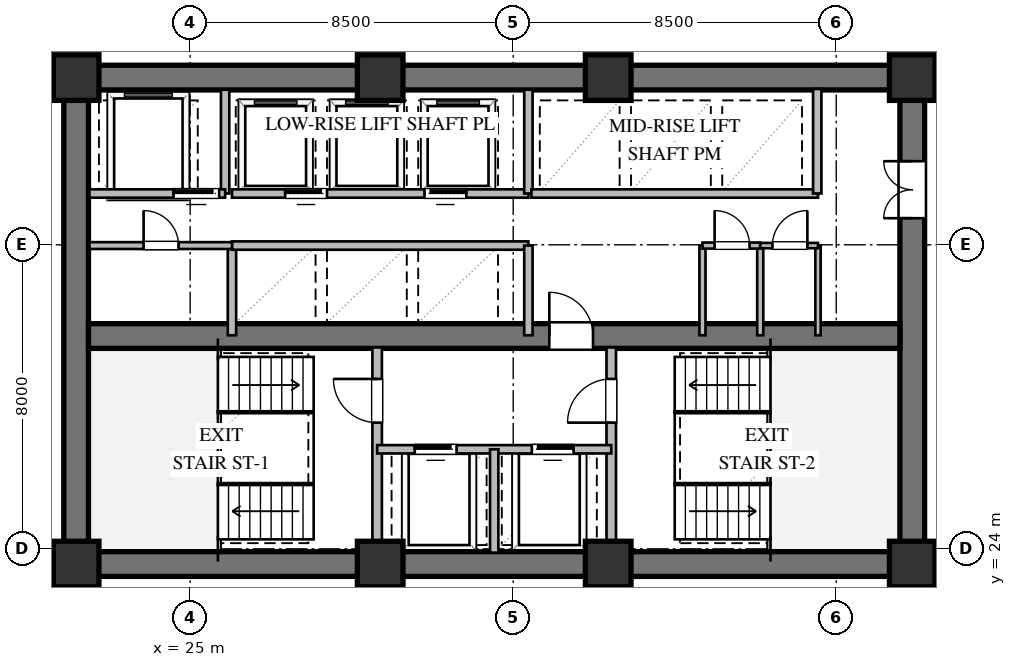
"""IFC4 building model, lengths in metres.
Left out: names, types, materials, properties, quantities, classifications, styles, units other than length and angle.
Written with IfcOpenShell. Run it as: python <this file> out.ifc"""

import sys

from ifc_helpers import new_model, si_unit, direction, frame, frame_2d, origin, origin_2d, place, context, subcontext, project, spatial, rectangle, extrude, element, fill, save


model = new_model("IFC4")
c1 = context("Model", 3, precision=1e-05, world=origin(), true_north=direction((0.0, 1.0)))
c2 = subcontext(c1, "Body", "Model", "MODEL_VIEW")
j1 = project(units=[si_unit("LENGTHUNIT", "METRE"), si_unit("PLANEANGLEUNIT", "RADIAN")], contexts=[c1])
p1 = place(None, origin())
s1 = spatial("IfcSite", under=j1, at=p1, CompositionType="ELEMENT")
p2 = place(p1, origin())
s2 = spatial("IfcBuilding", under=s1, at=p2, CompositionType="ELEMENT")
p3 = place(p2, frame((0.0, 0.0, 70.8)))
s3 = spatial("IfcBuildingStorey", under=s2, at=p3, CompositionType="ELEMENT", Elevation=70.8)
for number, where, z_axis, x_axis in (
    (1, (21.675, 23.6, 0.0), (0.0, 0.0, 1.0), (1.0, 0.0, 0.0)),
    (2, (21.675, 36.4, 0.0), (0.0, 0.0, 1.0), (1.0, 0.0, 0.0)),
):
    element("IfcWall", number, at=place(p3, frame(where, z_axis=z_axis, x_axis=x_axis)), inside=s3, PredefinedType="SHEAR", context=c2, shape_type="SweptSolid", body=[
        extrude(rectangle(XDim=22.65, YDim=0.65, at=frame_2d((11.325, 0.0))), origin(), (0.0, 0.0, 1.0), 3.36),
    ])
p4 = place(p3, frame((22.0, 23.925, 0.0), z_axis=(0.0, 0.0, 1.0), x_axis=(0.0, 1.0, 0.0)))
e3 = element("IfcWall", 3, at=p4, inside=s3, PredefinedType="SHEAR", context=c2, shape_type="SweptSolid", body=[
    extrude(rectangle(XDim=12.15, YDim=0.65, at=frame_2d((6.075, 0.0))), origin(), (0.0, 0.0, 1.0), 3.36),
])
p5 = place(p3, frame((44.0, 23.925, 0.0), z_axis=(0.0, 0.0, 1.0), x_axis=(0.0, 1.0, 0.0)))
e4 = element("IfcWall", 4, at=p5, inside=s3, PredefinedType="SHEAR", context=c2, shape_type="SweptSolid", body=[
    extrude(rectangle(XDim=12.15, YDim=0.65, at=frame_2d((6.075, 0.0))), origin(), (0.0, 0.0, 1.0), 3.36),
])
p6 = place(p5, frame((8.775, 0.0, 0.0)))
e5 = element("IfcOpeningElement", 5, at=p6, cuts=e4, PredefinedType="OPENING", context=c2, shape_type="SweptSolid", body=[
    extrude(rectangle(XDim=1.5, YDim=2.15, at=frame_2d((0.75, 1.075))), frame((0.0, 0.335, 0.0), z_axis=(0.0, -1.0, 0.0), x_axis=(1.0, 0.0, 0.0)), (0.0, 0.0, 1.0), 0.67),
])
p7 = place(p3, frame((22.325, 29.6, 0.0), z_axis=(0.0, 0.0, 1.0), x_axis=(1.0, 0.0, 0.0)))
e6 = element("IfcWall", 6, at=p7, inside=s3, PredefinedType="SHEAR", context=c2, shape_type="SweptSolid", body=[
    extrude(rectangle(XDim=21.35, YDim=0.65, at=frame_2d((10.675, 0.0))), origin(), (0.0, 0.0, 1.0), 3.36),
])
p8 = place(p7, frame((12.125, 0.0, 0.0)))
e7 = element("IfcOpeningElement", 7, at=p8, cuts=e6, PredefinedType="OPENING", context=c2, shape_type="SweptSolid", body=[
    extrude(rectangle(XDim=1.15, YDim=2.1, at=frame_2d((0.575, 1.05))), frame((0.0, 0.335, 0.0), z_axis=(0.0, -1.0, 0.0), x_axis=(1.0, 0.0, 0.0)), (0.0, 0.0, 1.0), 0.67),
])
for number, where, z_axis, x_axis in (
    (8, (22.0, 23.6, 0.0), (0.0, 0.0, 1.0), (1.0, 0.0, 0.0)),
    (9, (30.0, 23.6, 0.0), (0.0, 0.0, 1.0), (1.0, 0.0, 0.0)),
    (10, (36.0, 23.6, 0.0), (0.0, 0.0, 1.0), (1.0, 0.0, 0.0)),
    (11, (44.0, 23.6, 0.0), (0.0, 0.0, 1.0), (1.0, 0.0, 0.0)),
    (12, (44.0, 36.4, 0.0), (0.0, 0.0, 1.0), (1.0, 0.0, 0.0)),
    (13, (36.0, 36.4, 0.0), (0.0, 0.0, 1.0), (1.0, 0.0, 0.0)),
    (14, (30.0, 36.4, 0.0), (0.0, 0.0, 1.0), (1.0, 0.0, 0.0)),
    (15, (22.0, 36.4, 0.0), (0.0, 0.0, 1.0), (1.0, 0.0, 0.0)),
):
    element("IfcColumn", number, at=place(p3, frame(where, z_axis=z_axis, x_axis=x_axis)), inside=s3, PredefinedType="COLUMN", context=c2, shape_type="SweptSolid", body=[
        extrude(rectangle(XDim=1.2, YDim=1.2, at=origin_2d()), origin(), (0.0, 0.0, 1.0), 3.6),
    ])
p9 = place(p3, frame((29.92, 23.9, 0.0), z_axis=(0.0, 0.0, 1.0), x_axis=(0.0, 1.0, 0.0)))
e16 = element("IfcWall", 16, at=p9, inside=s3, PredefinedType="SOLIDWALL", context=c2, shape_type="SweptSolid", body=[
    extrude(rectangle(XDim=5.4, YDim=0.25, at=frame_2d((2.7, 0.0))), origin(), (0.0, 0.0, 1.0), 3.36),
])
p10 = place(p9, frame((3.421, 0.0, 0.0)))
e17 = element("IfcOpeningElement", 17, at=p10, cuts=e16, PredefinedType="OPENING", context=c2, shape_type="SweptSolid", body=[
    extrude(rectangle(XDim=1.15, YDim=2.1, at=frame_2d((0.575, 1.05))), frame((0.0, 0.135, 0.0), z_axis=(0.0, -1.0, 0.0), x_axis=(1.0, 0.0, 0.0)), (0.0, 0.0, 1.0), 0.27),
])
p11 = place(p3, frame((36.08, 23.9, 0.0), z_axis=(0.0, 0.0, 1.0), x_axis=(0.0, 1.0, 0.0)))
e18 = element("IfcWall", 18, at=p11, inside=s3, PredefinedType="SOLIDWALL", context=c2, shape_type="SweptSolid", body=[
    extrude(rectangle(XDim=5.4, YDim=0.25, at=frame_2d((2.7, 0.0))), origin(), (0.0, 0.0, 1.0), 3.36),
])
p12 = place(p11, frame((3.421, 0.0, 0.0)))
e19 = element("IfcOpeningElement", 19, at=p12, cuts=e18, PredefinedType="OPENING", context=c2, shape_type="SweptSolid", body=[
    extrude(rectangle(XDim=1.15, YDim=2.1, at=frame_2d((0.575, 1.05))), frame((0.0, 0.135, 0.0), z_axis=(0.0, -1.0, 0.0), x_axis=(1.0, 0.0, 0.0)), (0.0, 0.0, 1.0), 0.27),
])
p13 = place(p3, frame((29.92, 26.62, 0.0), z_axis=(0.0, 0.0, 1.0), x_axis=(1.0, 0.0, 0.0)))
e20 = element("IfcWall", 20, at=p13, inside=s3, PredefinedType="SOLIDWALL", context=c2, shape_type="SweptSolid", body=[
    extrude(rectangle(XDim=6.16, YDim=0.22, at=frame_2d((3.08, 0.0))), origin(), (0.0, 0.0, 1.0), 3.36),
])
p14 = place(p13, frame((0.99, 0.0, 0.0)))
e21 = element("IfcOpeningElement", 21, at=p14, cuts=e20, PredefinedType="OPENING", context=c2, shape_type="SweptSolid", body=[
    extrude(rectangle(XDim=1.1, YDim=2.1, at=frame_2d((0.55, 1.05))), frame((0.0, 0.12, 0.0), z_axis=(0.0, -1.0, 0.0), x_axis=(1.0, 0.0, 0.0)), (0.0, 0.0, 1.0), 0.24),
])
p15 = place(p13, frame((4.07, 0.0, 0.0)))
e22 = element("IfcOpeningElement", 22, at=p15, cuts=e20, PredefinedType="OPENING", context=c2, shape_type="SweptSolid", body=[
    extrude(rectangle(XDim=1.1, YDim=2.1, at=frame_2d((0.55, 1.05))), frame((0.0, 0.12, 0.0), z_axis=(0.0, -1.0, 0.0), x_axis=(1.0, 0.0, 0.0)), (0.0, 0.0, 1.0), 0.24),
])
p16 = place(p3, frame((33.0, 23.9, 0.0), z_axis=(0.0, 0.0, 1.0), x_axis=(0.0, 1.0, 0.0)))
e23 = element("IfcWall", 23, at=p16, inside=s3, PredefinedType="SOLIDWALL", context=c2, shape_type="SweptSolid", body=[
    extrude(rectangle(XDim=2.72, YDim=0.22, at=frame_2d((1.36, 0.0))), origin(), (0.0, 0.0, 1.0), 3.36),
])
p17 = place(p3, frame((25.92, 33.35, 0.0), z_axis=(0.0, 0.0, 1.0), x_axis=(0.0, 1.0, 0.0)))
e24 = element("IfcWall", 24, at=p17, inside=s3, PredefinedType="SOLIDWALL", context=c2, shape_type="SweptSolid", body=[
    extrude(rectangle(XDim=2.73, YDim=0.22, at=frame_2d((1.365, 0.0))), origin(), (0.0, 0.0, 1.0), 3.36),
])
p18 = place(p3, frame((22.35, 33.35, 0.0), z_axis=(0.0, 0.0, 1.0), x_axis=(1.0, 0.0, 0.0)))
e25 = element("IfcWall", 25, at=p18, inside=s3, PredefinedType="SOLIDWALL", context=c2, shape_type="SweptSolid", body=[
    extrude(rectangle(XDim=3.57, YDim=0.22, at=frame_2d((1.785, 0.0))), origin(), (0.0, 0.0, 1.0), 3.36),
])
p19 = place(p18, frame((2.213, 0.0, 0.0)))
e26 = element("IfcOpeningElement", 26, at=p19, cuts=e25, PredefinedType="OPENING", context=c2, shape_type="SweptSolid", body=[
    extrude(rectangle(XDim=1.2, YDim=2.1, at=frame_2d((0.6, 1.05))), frame((0.0, 0.12, 0.0), z_axis=(0.0, -1.0, 0.0), x_axis=(1.0, 0.0, 0.0)), (0.0, 0.0, 1.0), 0.24),
])
p20 = place(p3, frame((26.1, 29.62, 0.0), z_axis=(0.0, 0.0, 1.0), x_axis=(0.0, 1.0, 0.0)))
e27 = element("IfcWall", 27, at=p20, inside=s3, PredefinedType="SOLIDWALL", context=c2, shape_type="SweptSolid", body=[
    extrude(rectangle(XDim=2.36, YDim=0.22, at=frame_2d((1.18, 0.0))), origin(), (0.0, 0.0, 1.0), 3.36),
])
p21 = place(p3, frame((26.1, 31.98, 0.0), z_axis=(0.0, 0.0, 1.0), x_axis=(1.0, 0.0, 0.0)))
e28 = element("IfcWall", 28, at=p21, inside=s3, PredefinedType="SOLIDWALL", context=c2, shape_type="SweptSolid", body=[
    extrude(rectangle(XDim=7.8, YDim=0.22, at=frame_2d((3.9, 0.0))), origin(), (0.0, 0.0, 1.0), 3.36),
])
p22 = place(p3, frame((33.9, 29.62, 0.0), z_axis=(0.0, 0.0, 1.0), x_axis=(0.0, 1.0, 0.0)))
e29 = element("IfcWall", 29, at=p22, inside=s3, PredefinedType="SOLIDWALL", context=c2, shape_type="SweptSolid", body=[
    extrude(rectangle(XDim=2.36, YDim=0.22, at=frame_2d((1.18, 0.0))), origin(), (0.0, 0.0, 1.0), 3.36),
])
p23 = place(p3, frame((26.1, 33.35, 0.0), z_axis=(0.0, 0.0, 1.0), x_axis=(1.0, 0.0, 0.0)))
e30 = element("IfcWall", 30, at=p23, inside=s3, PredefinedType="SOLIDWALL", context=c2, shape_type="SweptSolid", body=[
    extrude(rectangle(XDim=7.8, YDim=0.22, at=frame_2d((3.9, 0.0))), origin(), (0.0, 0.0, 1.0), 3.36),
])
p24 = place(p23, frame((1.4, 0.0, 0.0)))
e31 = element("IfcOpeningElement", 31, at=p24, cuts=e30, PredefinedType="OPENING", context=c2, shape_type="SweptSolid", body=[
    extrude(rectangle(XDim=1.1, YDim=2.1, at=frame_2d((0.55, 1.05))), frame((0.0, 0.12, 0.0), z_axis=(0.0, -1.0, 0.0), x_axis=(1.0, 0.0, 0.0)), (0.0, 0.0, 1.0), 0.24),
])
p25 = place(p23, frame((5.066, 0.0, 0.0)))
e32 = element("IfcOpeningElement", 32, at=p25, cuts=e30, PredefinedType="OPENING", context=c2, shape_type="SweptSolid", body=[
    extrude(rectangle(XDim=1.1, YDim=2.1, at=frame_2d((0.55, 1.05))), frame((0.0, 0.12, 0.0), z_axis=(0.0, -1.0, 0.0), x_axis=(1.0, 0.0, 0.0)), (0.0, 0.0, 1.0), 0.24),
])
p26 = place(p3, frame((33.9, 33.35, 0.0), z_axis=(0.0, 0.0, 1.0), x_axis=(0.0, 1.0, 0.0)))
e33 = element("IfcWall", 33, at=p26, inside=s3, PredefinedType="SOLIDWALL", context=c2, shape_type="SweptSolid", body=[
    extrude(rectangle(XDim=2.73, YDim=0.22, at=frame_2d((1.365, 0.0))), origin(), (0.0, 0.0, 1.0), 3.36),
])
p27 = place(p3, frame((33.98, 33.35, 0.0), z_axis=(0.0, 0.0, 1.0), x_axis=(1.0, 0.0, 0.0)))
e34 = element("IfcWall", 34, at=p27, inside=s3, PredefinedType="SOLIDWALL", context=c2, shape_type="SweptSolid", body=[
    extrude(rectangle(XDim=7.54, YDim=0.22, at=frame_2d((3.77, 0.0))), origin(), (0.0, 0.0, 1.0), 3.36),
])
p28 = place(p3, frame((41.5, 33.35, 0.0), z_axis=(0.0, 0.0, 1.0), x_axis=(0.0, 1.0, 0.0)))
e35 = element("IfcWall", 35, at=p28, inside=s3, PredefinedType="SOLIDWALL", context=c2, shape_type="SweptSolid", body=[
    extrude(rectangle(XDim=2.75, YDim=0.22, at=frame_2d((1.375, 0.0))), origin(), (0.0, 0.0, 1.0), 3.36),
])
p29 = place(p3, frame((22.35, 31.98, 0.0), z_axis=(0.0, 0.0, 1.0), x_axis=(1.0, 0.0, 0.0)))
e36 = element("IfcWall", 36, at=p29, inside=s3, PredefinedType="PARTITIONING", context=c2, shape_type="SweptSolid", body=[
    extrude(rectangle(XDim=3.75, YDim=0.18, at=frame_2d((1.875, 0.0))), origin(), (0.0, 0.0, 1.0), 3.36),
])
p30 = place(p29, frame((1.425, 0.0, 0.0)))
e37 = element("IfcOpeningElement", 37, at=p30, cuts=e36, PredefinedType="OPENING", context=c2, shape_type="SweptSolid", body=[
    extrude(rectangle(XDim=0.92, YDim=2.1, at=frame_2d((0.46, 1.05))), frame((0.0, 0.1, 0.0), z_axis=(0.0, -1.0, 0.0), x_axis=(1.0, 0.0, 0.0)), (0.0, 0.0, 1.0), 0.2),
])
for number, where, z_axis, x_axis in (
    (38, (38.48, 29.62, 0.0), (0.0, 0.0, 1.0), (0.0, 1.0, 0.0)),
    (39, (40.0, 29.62, 0.0), (0.0, 0.0, 1.0), (0.0, 1.0, 0.0)),
):
    element("IfcWall", number, at=place(p3, frame(where, z_axis=z_axis, x_axis=x_axis)), inside=s3, PredefinedType="PLUMBINGWALL", context=c2, shape_type="SweptSolid", body=[
        extrude(rectangle(XDim=2.36, YDim=0.16, at=frame_2d((1.18, 0.0))), origin(), (0.0, 0.0, 1.0), 3.36),
    ])
p31 = place(p3, frame((41.52, 29.62, 0.0), z_axis=(0.0, 0.0, 1.0), x_axis=(0.0, 1.0, 0.0)))
e40 = element("IfcWall", 40, at=p31, inside=s3, PredefinedType="PARTITIONING", context=c2, shape_type="SweptSolid", body=[
    extrude(rectangle(XDim=2.36, YDim=0.14, at=frame_2d((1.18, 0.0))), origin(), (0.0, 0.0, 1.0), 3.36),
])
p32 = place(p3, frame((38.48, 31.98, 0.0), z_axis=(0.0, 0.0, 1.0), x_axis=(1.0, 0.0, 0.0)))
e41 = element("IfcWall", 41, at=p32, inside=s3, PredefinedType="PLUMBINGWALL", context=c2, shape_type="SweptSolid", body=[
    extrude(rectangle(XDim=1.52, YDim=0.16, at=frame_2d((0.76, 0.0))), origin(), (0.0, 0.0, 1.0), 3.36),
])
p33 = place(p32, frame((0.32, 0.0, 0.0)))
e42 = element("IfcOpeningElement", 42, at=p33, cuts=e41, PredefinedType="OPENING", context=c2, shape_type="SweptSolid", body=[
    extrude(rectangle(XDim=0.92, YDim=2.1, at=frame_2d((0.46, 1.05))), frame((0.0, 0.09, 0.0), z_axis=(0.0, -1.0, 0.0), x_axis=(1.0, 0.0, 0.0)), (0.0, 0.0, 1.0), 0.18),
])
p34 = place(p3, frame((40.0, 31.98, 0.0), z_axis=(0.0, 0.0, 1.0), x_axis=(1.0, 0.0, 0.0)))
e43 = element("IfcWall", 43, at=p34, inside=s3, PredefinedType="PARTITIONING", context=c2, shape_type="SweptSolid", body=[
    extrude(rectangle(XDim=1.52, YDim=0.14, at=frame_2d((0.76, 0.0))), origin(), (0.0, 0.0, 1.0), 3.36),
])
p35 = place(p34, frame((0.32, 0.0, 0.0)))
e44 = element("IfcOpeningElement", 44, at=p35, cuts=e43, PredefinedType="OPENING", context=c2, shape_type="SweptSolid", body=[
    extrude(rectangle(XDim=0.92, YDim=2.1, at=frame_2d((0.46, 1.05))), frame((0.0, 0.08, 0.0), z_axis=(0.0, -1.0, 0.0), x_axis=(1.0, 0.0, 0.0)), (0.0, 0.0, 1.0), 0.16),
])
p36 = place(p10, origin())
e45 = element("IfcDoor", 45, at=p36, inside=s3, OperationType="SINGLE_SWING_RIGHT", PredefinedType="DOOR", context=c2, shape_type="SweptSolid", body=[
    extrude(rectangle(XDim=1.15, YDim=2.1, at=frame_2d((0.575, 1.05))), frame((0.0, 0.025, 0.0), z_axis=(0.0, -1.0, 0.0), x_axis=(1.0, 0.0, 0.0)), (0.0, 0.0, 1.0), 0.05),
])
fill(e17, e45)
p37 = place(p12, origin())
e46 = element("IfcDoor", 46, at=p37, inside=s3, OperationType="SINGLE_SWING_LEFT", PredefinedType="DOOR", context=c2, shape_type="SweptSolid", body=[
    extrude(rectangle(XDim=1.15, YDim=2.1, at=frame_2d((0.575, 1.05))), frame((0.0, 0.025, 0.0), z_axis=(0.0, -1.0, 0.0), x_axis=(1.0, 0.0, 0.0)), (0.0, 0.0, 1.0), 0.05),
])
fill(e19, e46)
p38 = place(p14, origin())
e47 = element("IfcDoor", 47, at=p38, inside=s3, OperationType="SLIDING_TO_LEFT", PredefinedType="DOOR", context=c2, shape_type="SweptSolid", body=[
    extrude(rectangle(XDim=1.1, YDim=2.1, at=frame_2d((0.55, 1.05))), frame((0.0, 0.025, 0.0), z_axis=(0.0, -1.0, 0.0), x_axis=(1.0, 0.0, 0.0)), (0.0, 0.0, 1.0), 0.05),
])
fill(e21, e47)
p39 = place(p15, origin())
e48 = element("IfcDoor", 48, at=p39, inside=s3, OperationType="SLIDING_TO_RIGHT", PredefinedType="DOOR", context=c2, shape_type="SweptSolid", body=[
    extrude(rectangle(XDim=1.1, YDim=2.1, at=frame_2d((0.55, 1.05))), frame((0.0, 0.025, 0.0), z_axis=(0.0, -1.0, 0.0), x_axis=(1.0, 0.0, 0.0)), (0.0, 0.0, 1.0), 0.05),
])
fill(e22, e48)
p40 = place(p8, origin())
e49 = element("IfcDoor", 49, at=p40, inside=s3, OperationType="SINGLE_SWING_LEFT", PredefinedType="DOOR", context=c2, shape_type="SweptSolid", body=[
    extrude(rectangle(XDim=1.15, YDim=2.1, at=frame_2d((0.575, 1.05))), frame((0.0, 0.025, 0.0), z_axis=(0.0, -1.0, 0.0), x_axis=(1.0, 0.0, 0.0)), (0.0, 0.0, 1.0), 0.05),
])
fill(e7, e49)
p41 = place(p6, origin())
e50 = element("IfcDoor", 50, at=p41, inside=s3, OperationType="DOUBLE_DOOR_SINGLE_SWING", PredefinedType="DOOR", context=c2, shape_type="SweptSolid", body=[
    extrude(rectangle(XDim=1.5, YDim=2.15, at=frame_2d((0.75, 1.075))), frame((0.0, 0.025, 0.0), z_axis=(0.0, -1.0, 0.0), x_axis=(1.0, 0.0, 0.0)), (0.0, 0.0, 1.0), 0.05),
])
fill(e5, e50)
p42 = place(p19, origin())
e51 = element("IfcDoor", 51, at=p42, inside=s3, OperationType="SLIDING_TO_LEFT", PredefinedType="DOOR", context=c2, shape_type="SweptSolid", body=[
    extrude(rectangle(XDim=1.2, YDim=2.1, at=frame_2d((0.6, 1.05))), frame((0.0, 0.025, 0.0), z_axis=(0.0, -1.0, 0.0), x_axis=(1.0, 0.0, 0.0)), (0.0, 0.0, 1.0), 0.05),
])
fill(e26, e51)
p43 = place(p24, origin())
e52 = element("IfcDoor", 52, at=p43, inside=s3, OperationType="SLIDING_TO_LEFT", PredefinedType="DOOR", context=c2, shape_type="SweptSolid", body=[
    extrude(rectangle(XDim=1.1, YDim=2.1, at=frame_2d((0.55, 1.05))), frame((0.0, 0.025, 0.0), z_axis=(0.0, -1.0, 0.0), x_axis=(1.0, 0.0, 0.0)), (0.0, 0.0, 1.0), 0.05),
])
fill(e31, e52)
p44 = place(p25, origin())
e53 = element("IfcDoor", 53, at=p44, inside=s3, OperationType="SLIDING_TO_RIGHT", PredefinedType="DOOR", context=c2, shape_type="SweptSolid", body=[
    extrude(rectangle(XDim=1.1, YDim=2.1, at=frame_2d((0.55, 1.05))), frame((0.0, 0.025, 0.0), z_axis=(0.0, -1.0, 0.0), x_axis=(1.0, 0.0, 0.0)), (0.0, 0.0, 1.0), 0.05),
])
fill(e32, e53)
p45 = place(p30, origin())
e54 = element("IfcDoor", 54, at=p45, inside=s3, OperationType="SINGLE_SWING_LEFT", PredefinedType="DOOR", context=c2, shape_type="SweptSolid", body=[
    extrude(rectangle(XDim=0.92, YDim=2.1, at=frame_2d((0.46, 1.05))), frame((0.0, 0.025, 0.0), z_axis=(0.0, -1.0, 0.0), x_axis=(1.0, 0.0, 0.0)), (0.0, 0.0, 1.0), 0.05),
])
fill(e37, e54)
p46 = place(p33, origin())
e55 = element("IfcDoor", 55, at=p46, inside=s3, OperationType="SINGLE_SWING_LEFT", PredefinedType="DOOR", context=c2, shape_type="SweptSolid", body=[
    extrude(rectangle(XDim=0.92, YDim=2.1, at=frame_2d((0.46, 1.05))), frame((0.0, 0.025, 0.0), z_axis=(0.0, -1.0, 0.0), x_axis=(1.0, 0.0, 0.0)), (0.0, 0.0, 1.0), 0.05),
])
fill(e42, e55)
p47 = place(p35, origin())
e56 = element("IfcDoor", 56, at=p47, inside=s3, OperationType="SINGLE_SWING_RIGHT", PredefinedType="DOOR", context=c2, shape_type="SweptSolid", body=[
    extrude(rectangle(XDim=0.92, YDim=2.1, at=frame_2d((0.46, 1.05))), frame((0.0, 0.025, 0.0), z_axis=(0.0, -1.0, 0.0), x_axis=(1.0, 0.0, 0.0)), (0.0, 0.0, 1.0), 0.05),
])
fill(e44, e56)
save(model, sys.argv[1])
